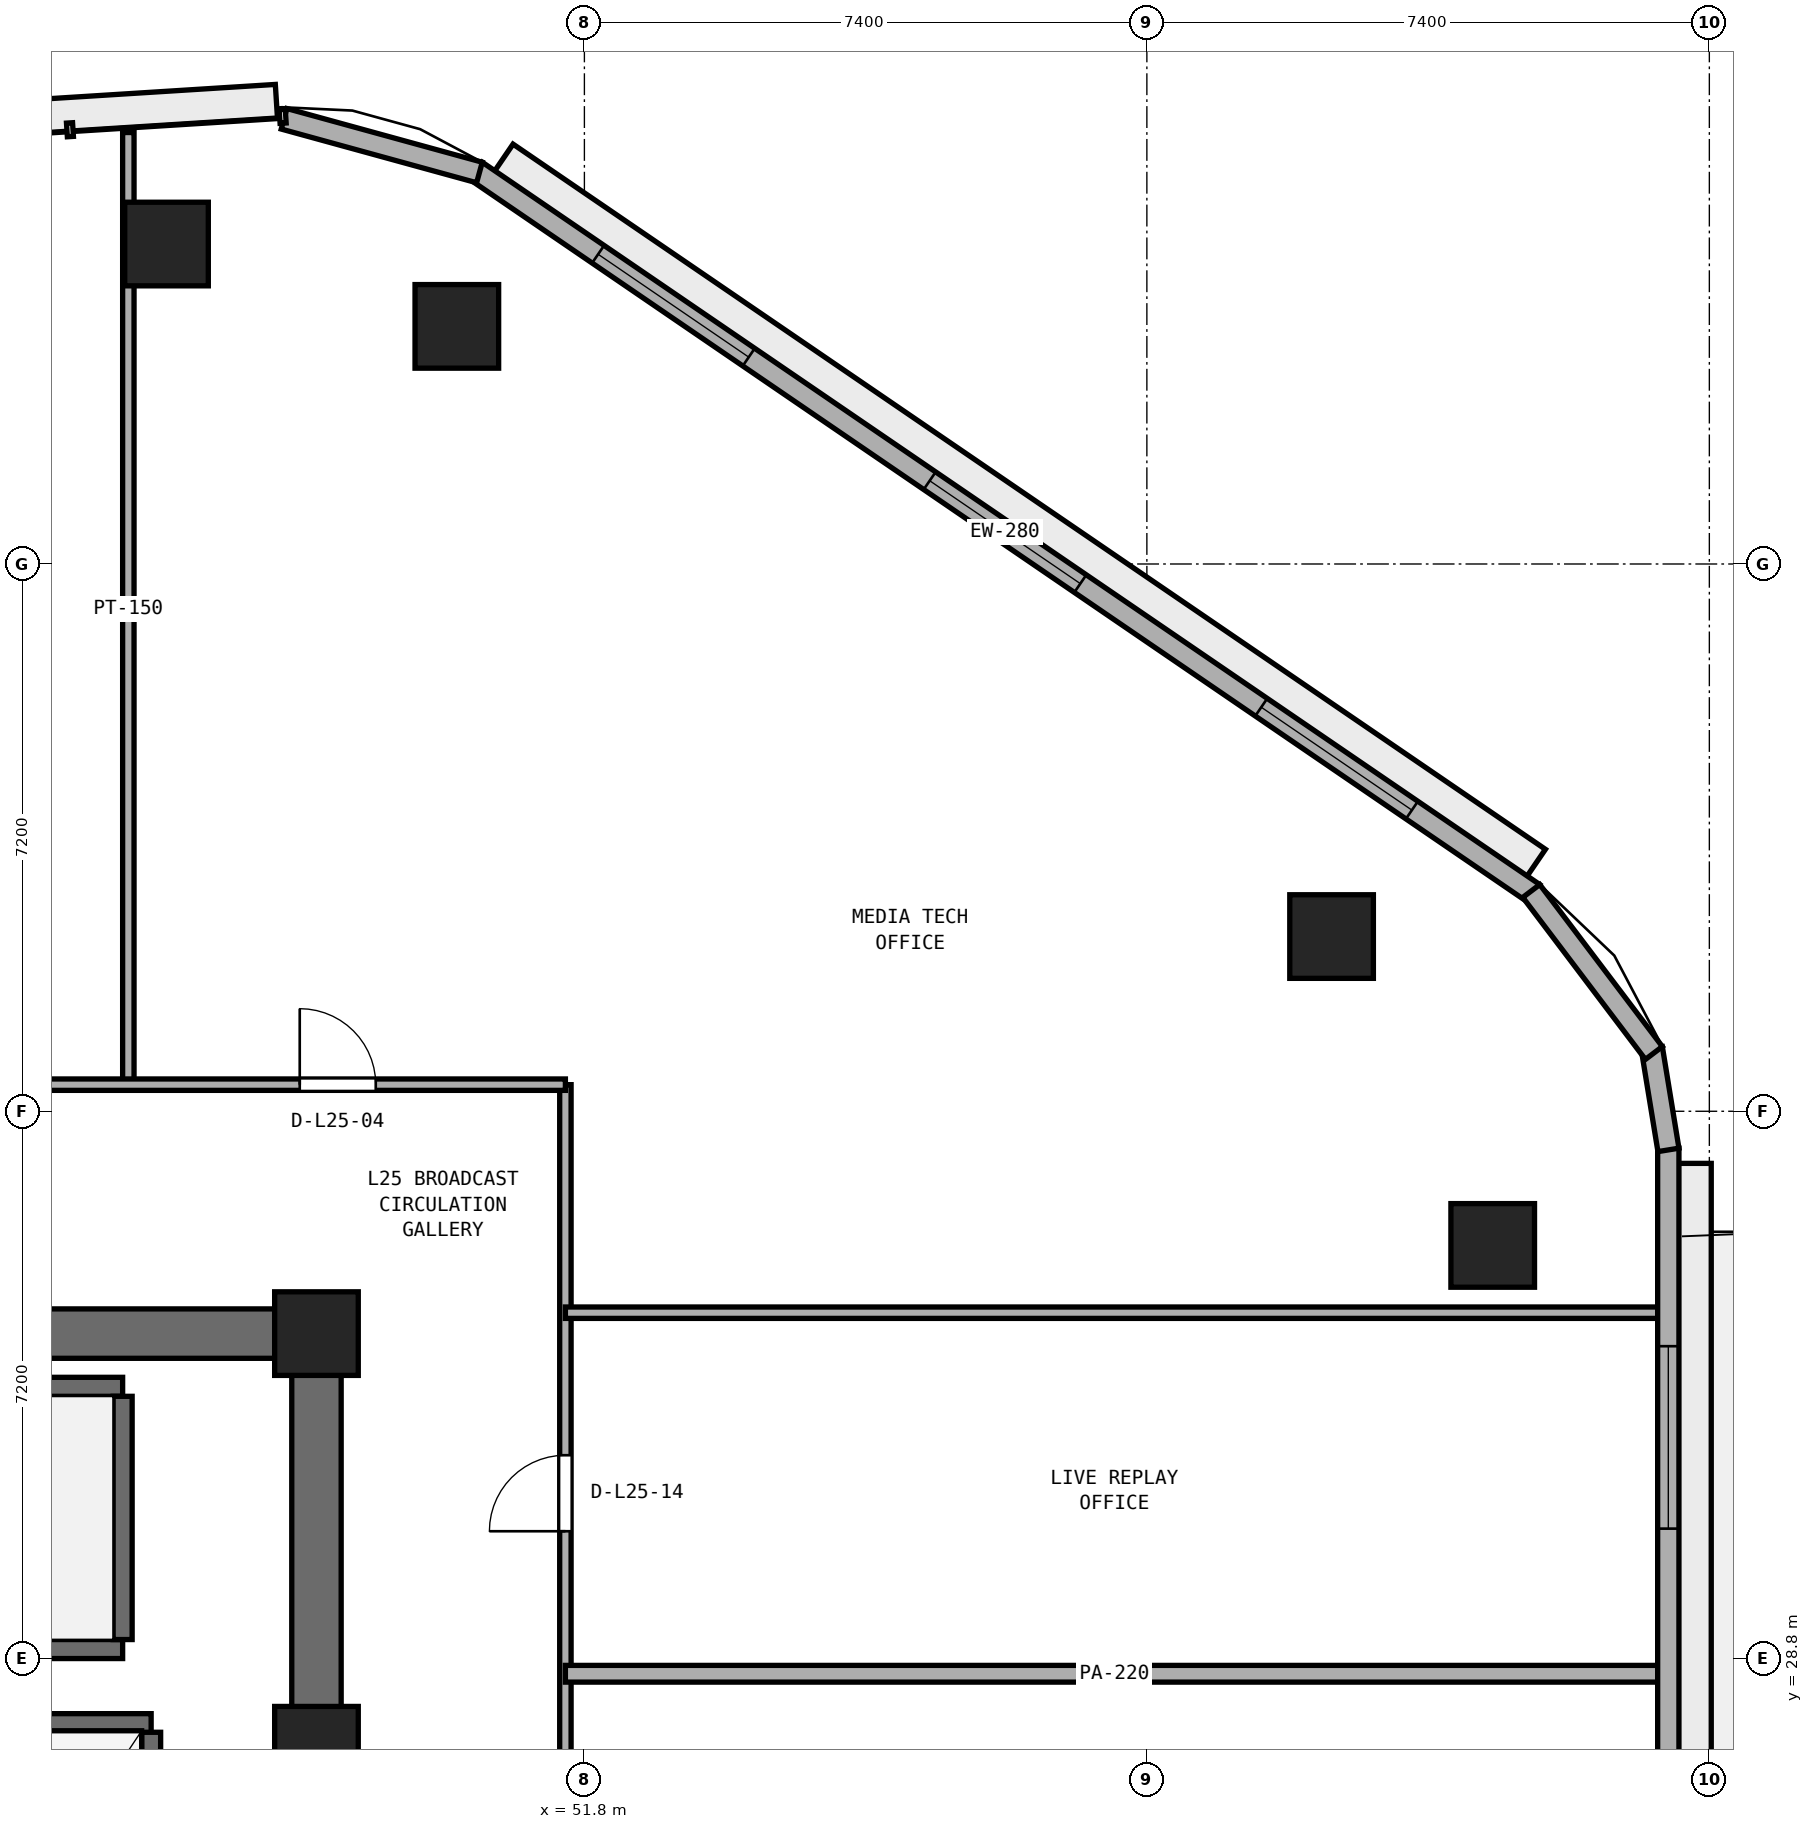
"""IFC4 building model, lengths in metres.
Left out: names, types, materials, properties, quantities, classifications, styles, units other than length and angle.
Written with IfcOpenShell. Run it as: python <this file> out.ifc"""

import sys

from ifc_helpers import new_model, si_unit, direction, frame, frame_2d, origin, origin_2d, place, context, subcontext, project, spatial, rectangle, extrude, element, fill, save


model = new_model("IFC4")
c1 = context("Model", 3, precision=1e-05, world=origin(), true_north=direction((0.0, 1.0)))
c2 = subcontext(c1, "Body", "Model", "MODEL_VIEW")
j1 = project(units=[si_unit("LENGTHUNIT", "METRE"), si_unit("PLANEANGLEUNIT", "RADIAN")], contexts=[c1])
p1 = place(None, origin())
s1 = spatial("IfcSite", under=j1, at=p1, CompositionType="ELEMENT")
p2 = place(p1, origin())
s2 = spatial("IfcBuilding", under=s1, at=p2, CompositionType="ELEMENT")
p3 = place(p2, frame((0.0, 0.0, 101.0)))
s3 = spatial("IfcBuildingStorey", under=s2, at=p3, CompositionType="ELEMENT", Elevation=101.0)
p4 = place(p3, frame((25.4, 33.075, 0.0), z_axis=(0.0, 0.0, 1.0), x_axis=(1.0, 0.0, 0.0)))
e1 = element("IfcWall", 1, at=p4, inside=s3, PredefinedType="SHEAR", context=c2, shape_type="SweptSolid", body=[
    extrude(rectangle(XDim=23.2, YDim=0.65, at=frame_2d((11.6, 0.0))), origin(), (0.0, 0.0, 1.0), 3.525),
])
p5 = place(p3, frame((48.275, 17.65, 0.0), z_axis=(0.0, 0.0, 1.0), x_axis=(0.0, 1.0, 0.0)))
e2 = element("IfcWall", 2, at=p5, inside=s3, PredefinedType="SHEAR", context=c2, shape_type="SweptSolid", body=[
    extrude(rectangle(XDim=15.1, YDim=0.65, at=frame_2d((7.55, 0.0))), origin(), (0.0, 0.0, 1.0), 3.525),
])
p6 = place(p5, frame((5.65, 0.0, 0.0)))
e3 = element("IfcOpeningElement", 3, at=p6, cuts=e2, PredefinedType="OPENING", context=c2, shape_type="SweptSolid", body=[
    extrude(rectangle(XDim=1.5, YDim=2.15, at=frame_2d((0.75, 1.075))), frame((0.0, 0.335, 0.0), z_axis=(0.0, -1.0, 0.0), x_axis=(1.0, 0.0, 0.0)), (0.0, 0.0, 1.0), 0.67),
])
for number, where, z_axis, x_axis in (
    (4, (48.275, 27.62, 0.0), (0.0, 0.0, 1.0), (1.0, 0.0, 0.0)),
    (5, (48.275, 33.075, 0.0), (0.0, 0.0, 1.0), (1.0, 0.0, 0.0)),
):
    element("IfcColumn", number, at=place(p3, frame(where, z_axis=z_axis, x_axis=x_axis)), inside=s3, PredefinedType="PILASTER", context=c2, shape_type="SweptSolid", body=[
        extrude(rectangle(XDim=1.1, YDim=1.1, at=origin_2d()), origin(), (0.0, 0.0, 1.0), 3.8),
    ])
for number, where, z_axis, x_axis in (
    (6, (63.75, 34.235, 0.0), (0.0, 0.0, 1.0), (1.0, 0.0, 0.0)),
    (7, (61.63, 38.299, 0.0), (0.0, 0.0, 1.0), (1.0, 0.0, 0.0)),
    (8, (50.122, 46.326, 0.0), (0.0, 0.0, 1.0), (1.0, 0.0, 0.0)),
    (9, (46.302, 47.409, 0.0), (0.0, 0.0, 1.0), (1.0, 0.0, 0.0)),
):
    element("IfcColumn", number, at=place(p3, frame(where, z_axis=z_axis, x_axis=x_axis)), inside=s3, PredefinedType="COLUMN", context=c2, shape_type="SweptSolid", body=[
        extrude(rectangle(XDim=1.1, YDim=1.1, at=origin_2d()), origin(), (0.0, 0.0, 1.0), 3.8),
    ])
for number, where, z_axis, x_axis in (
    (10, (38.425, 28.925, 0.0), (0.0, 0.0, 1.0), (1.0, 0.0, 0.0)),
    (11, (38.425, 32.375, 0.0), (0.0, 0.0, 1.0), (1.0, 0.0, 0.0)),
):
    element("IfcWall", number, at=place(p3, frame(where, z_axis=z_axis, x_axis=x_axis)), inside=s3, PredefinedType="SHEAR", context=c2, shape_type="SweptSolid", body=[
        extrude(rectangle(XDim=7.3, YDim=0.25, at=frame_2d((3.65, 0.0))), origin(), (0.0, 0.0, 1.0), 3.525),
    ])
p7 = place(p3, frame((45.725, 29.05, 0.0), z_axis=(0.0, 0.0, 1.0), x_axis=(0.0, 1.0, 0.0)))
e12 = element("IfcWall", 12, at=p7, inside=s3, PredefinedType="SHEAR", context=c2, shape_type="SweptSolid", body=[
    extrude(rectangle(XDim=3.2, YDim=0.25, at=frame_2d((1.6, 0.0))), origin(), (0.0, 0.0, 1.0), 3.525),
])
p8 = place(p3, frame((44.25, 27.95, 0.0), z_axis=(0.0, 0.0, 1.0), x_axis=(1.0, 0.0, 0.0)))
e13 = element("IfcWall", 13, at=p8, inside=s3, PredefinedType="SHEAR", context=c2, shape_type="SweptSolid", body=[
    extrude(rectangle(XDim=1.85, YDim=0.25, at=frame_2d((0.925, 0.0))), origin(), (0.0, 0.0, 1.0), 3.525),
])
p9 = place(p3, frame((46.1, 25.47, 0.0), z_axis=(0.0, 0.0, 1.0), x_axis=(0.0, 1.0, 0.0)))
e14 = element("IfcWall", 14, at=p9, inside=s3, PredefinedType="SHEAR", context=c2, shape_type="SweptSolid", body=[
    extrude(rectangle(XDim=2.36, YDim=0.25, at=frame_2d((1.18, 0.0))), origin(), (0.0, 0.0, 1.0), 3.525),
])
p10 = place(p3, frame((51.55, 14.05, 0.0), z_axis=(0.0, 0.0, 1.0), x_axis=(0.0, 1.0, 0.0)))
e15 = element("IfcWall", 15, at=p10, inside=s3, PredefinedType="PARTITIONING", context=c2, shape_type="SweptSolid", body=[
    extrude(rectangle(XDim=22.3, YDim=0.15, at=frame_2d((11.15, 0.0))), origin(), (0.0, 0.0, 1.0), 3.525),
])
p11 = place(p10, frame((4.325, 0.0, 0.0)))
e16 = element("IfcOpeningElement", 16, at=p11, cuts=e15, PredefinedType="OPENING", context=c2, shape_type="SweptSolid", body=[
    extrude(rectangle(XDim=0.9, YDim=2.1, at=frame_2d((0.45, 1.05))), frame((0.0, 0.085, 0.0), z_axis=(0.0, -1.0, 0.0), x_axis=(1.0, 0.0, 0.0)), (0.0, 0.0, 1.0), 0.17),
])
p12 = place(p10, frame((10.05, 0.0, 0.0)))
e17 = element("IfcOpeningElement", 17, at=p12, cuts=e15, PredefinedType="OPENING", context=c2, shape_type="SweptSolid", body=[
    extrude(rectangle(XDim=1.0, YDim=2.12, at=frame_2d((0.5, 1.06))), frame((0.0, 0.085, 0.0), z_axis=(0.0, -1.0, 0.0), x_axis=(1.0, 0.0, 0.0)), (0.0, 0.0, 1.0), 0.17),
])
p13 = place(p10, frame((16.425, 0.0, 0.0)))
e18 = element("IfcOpeningElement", 18, at=p13, cuts=e15, PredefinedType="OPENING", context=c2, shape_type="SweptSolid", body=[
    extrude(rectangle(XDim=1.0, YDim=2.12, at=frame_2d((0.5, 1.06))), frame((0.0, 0.085, 0.0), z_axis=(0.0, -1.0, 0.0), x_axis=(1.0, 0.0, 0.0)), (0.0, 0.0, 1.0), 0.17),
])
p14 = place(p3, frame((45.8, 36.35, 0.0), z_axis=(0.0, 0.0, 1.0), x_axis=(0.0, 1.0, 0.0)))
e19 = element("IfcWall", 19, at=p14, inside=s3, PredefinedType="PARTITIONING", context=c2, shape_type="SweptSolid", body=[
    extrude(rectangle(XDim=12.526, YDim=0.15, at=frame_2d((6.263, 0.0))), origin(), (0.0, 0.0, 1.0), 3.525),
])
p15 = place(p3, frame((51.55, 28.6, 0.0), z_axis=(0.0, 0.0, 1.0), x_axis=(1.0, 0.0, 0.0)))
e20 = element("IfcWall", 20, at=p15, inside=s3, PredefinedType="PARTITIONING", context=c2, shape_type="SweptSolid", body=[
    extrude(rectangle(XDim=14.445, YDim=0.22, at=frame_2d((7.223, 0.0))), origin(), (0.0, 0.0, 1.0), 3.525),
])
p16 = place(p3, frame((51.55, 33.35, 0.0), z_axis=(0.0, 0.0, 1.0), x_axis=(1.0, 0.0, 0.0)))
e21 = element("IfcWall", 21, at=p16, inside=s3, PredefinedType="PARTITIONING", context=c2, shape_type="SweptSolid", body=[
    extrude(rectangle(XDim=14.445, YDim=0.15, at=frame_2d((7.223, 0.0))), origin(), (0.0, 0.0, 1.0), 2.908),
])
p17 = place(p3, frame((22.45, 36.35, 0.0), z_axis=(0.0, 0.0, 1.0), x_axis=(1.0, 0.0, 0.0)))
e22 = element("IfcWall", 22, at=p17, inside=s3, PredefinedType="PARTITIONING", context=c2, shape_type="SweptSolid", body=[
    extrude(rectangle(XDim=29.1, YDim=0.15, at=frame_2d((14.55, 0.0))), origin(), (0.0, 0.0, 1.0), 3.525),
])
p18 = place(p17, frame((2.795, 0.0, 0.0)))
e23 = element("IfcOpeningElement", 23, at=p18, cuts=e22, PredefinedType="OPENING", context=c2, shape_type="SweptSolid", body=[
    extrude(rectangle(XDim=1.0, YDim=2.12, at=frame_2d((0.5, 1.06))), frame((0.0, 0.085, 0.0), z_axis=(0.0, -1.0, 0.0), x_axis=(1.0, 0.0, 0.0)), (0.0, 0.0, 1.0), 0.17),
])
p19 = place(p17, frame((10.15, 0.0, 0.0)))
e24 = element("IfcOpeningElement", 24, at=p19, cuts=e22, PredefinedType="OPENING", context=c2, shape_type="SweptSolid", body=[
    extrude(rectangle(XDim=1.0, YDim=2.12, at=frame_2d((0.5, 1.06))), frame((0.0, 0.085, 0.0), z_axis=(0.0, -1.0, 0.0), x_axis=(1.0, 0.0, 0.0)), (0.0, 0.0, 1.0), 0.17),
])
p20 = place(p17, frame((18.65, 0.0, 0.0)))
e25 = element("IfcOpeningElement", 25, at=p20, cuts=e22, PredefinedType="OPENING", context=c2, shape_type="SweptSolid", body=[
    extrude(rectangle(XDim=1.0, YDim=2.12, at=frame_2d((0.5, 1.06))), frame((0.0, 0.085, 0.0), z_axis=(0.0, -1.0, 0.0), x_axis=(1.0, 0.0, 0.0)), (0.0, 0.0, 1.0), 0.17),
])
p21 = place(p17, frame((25.605, 0.0, 0.0)))
e26 = element("IfcOpeningElement", 26, at=p21, cuts=e22, PredefinedType="OPENING", context=c2, shape_type="SweptSolid", body=[
    extrude(rectangle(XDim=1.0, YDim=2.12, at=frame_2d((0.5, 1.06))), frame((0.0, 0.085, 0.0), z_axis=(0.0, -1.0, 0.0), x_axis=(1.0, 0.0, 0.0)), (0.0, 0.0, 1.0), 0.17),
])
p22 = place(p3, frame((66.06, 16.183, 0.0), z_axis=(0.0, 0.0, 1.0), x_axis=(0.0, 1.0, 0.0)))
e27 = element("IfcWall", 27, at=p22, inside=s3, PredefinedType="STANDARD", context=c2, shape_type="SweptSolid", body=[
    extrude(rectangle(XDim=19.331, YDim=0.28, at=frame_2d((9.666, 0.0))), origin(), (0.0, 0.0, 1.0), 3.525),
])
p23 = place(p22, frame((9.115, 0.0, 0.0)))
e28 = element("IfcOpeningElement", 28, at=p23, cuts=e27, PredefinedType="OPENING", context=c2, shape_type="SweptSolid", body=[
    extrude(rectangle(XDim=1.1, YDim=2.2, at=frame_2d((0.55, 1.1))), frame((0.0, 0.15, 0.0), z_axis=(0.0, -1.0, 0.0), x_axis=(1.0, 0.0, 0.0)), (0.0, 0.0, 1.0), 0.3),
])
p24 = place(p22, frame((1.575, 0.0, 0.9)))
e29 = element("IfcOpeningElement", 29, at=p24, cuts=e27, PredefinedType="OPENING", context=c2, shape_type="SweptSolid", body=[
    extrude(rectangle(XDim=2.4, YDim=1.75, at=frame_2d((1.2, 0.875))), frame((0.0, 0.15, 0.0), z_axis=(0.0, -1.0, 0.0), x_axis=(1.0, 0.0, 0.0)), (0.0, 0.0, 1.0), 0.3),
])
p25 = place(p22, frame((14.326, 0.0, 0.9)))
e30 = element("IfcOpeningElement", 30, at=p25, cuts=e27, PredefinedType="OPENING", context=c2, shape_type="SweptSolid", body=[
    extrude(rectangle(XDim=2.4, YDim=1.75, at=frame_2d((1.2, 0.875))), frame((0.0, 0.15, 0.0), z_axis=(0.0, -1.0, 0.0), x_axis=(1.0, 0.0, 0.0)), (0.0, 0.0, 1.0), 0.3),
])
p26 = place(p3, frame((64.29, 38.867, 0.0), z_axis=(0.0, 0.0, 1.0), x_axis=(-0.825755550159, 0.564028165416, 0.0)))
e31 = element("IfcWall", 31, at=p26, inside=s3, PredefinedType="STANDARD", context=c2, shape_type="SweptSolid", body=[
    extrude(rectangle(XDim=16.848, YDim=0.28, at=frame_2d((8.424, 0.0))), origin(), (0.0, 0.0, 1.0), 3.525),
])
p27 = place(p26, frame((1.941, 0.0, 0.9)))
e32 = element("IfcOpeningElement", 32, at=p27, cuts=e31, PredefinedType="OPENING", context=c2, shape_type="SweptSolid", body=[
    extrude(rectangle(XDim=2.4, YDim=1.75, at=frame_2d((1.2, 0.875))), frame((0.0, 0.15, 0.0), z_axis=(0.0, -1.0, 0.0), x_axis=(1.0, 0.0, 0.0)), (0.0, 0.0, 1.0), 0.3),
])
p28 = place(p26, frame((7.224, 0.0, 0.9)))
e33 = element("IfcOpeningElement", 33, at=p28, cuts=e31, PredefinedType="OPENING", context=c2, shape_type="SweptSolid", body=[
    extrude(rectangle(XDim=2.4, YDim=1.75, at=frame_2d((1.2, 0.875))), frame((0.0, 0.15, 0.0), z_axis=(0.0, -1.0, 0.0), x_axis=(1.0, 0.0, 0.0)), (0.0, 0.0, 1.0), 0.3),
])
p29 = place(p26, frame((12.507, 0.0, 0.9)))
e34 = element("IfcOpeningElement", 34, at=p29, cuts=e31, PredefinedType="OPENING", context=c2, shape_type="SweptSolid", body=[
    extrude(rectangle(XDim=2.4, YDim=1.75, at=frame_2d((1.2, 0.875))), frame((0.0, 0.15, 0.0), z_axis=(0.0, -1.0, 0.0), x_axis=(1.0, 0.0, 0.0)), (0.0, 0.0, 1.0), 0.3),
])
p30 = place(p3, frame((66.062, 35.492, 0.0), z_axis=(0.0, 0.0, 1.0), x_axis=(-0.161182073582, 0.986924687682, 0.0)))
e35 = element("IfcWall", 35, at=p30, inside=s3, PredefinedType="STANDARD", context=c2, shape_type="SweptSolid", body=[
    extrude(rectangle(XDim=1.354, YDim=0.28, at=frame_2d((0.677, 0.0))), origin(), (0.0, 0.0, 1.0), 3.525),
])
p31 = place(p3, frame((65.87, 36.767, 0.0), z_axis=(0.0, 0.0, 1.0), x_axis=(-0.603370463754, 0.797461023166, 0.0)))
e36 = element("IfcWall", 36, at=p31, inside=s3, PredefinedType="STANDARD", context=c2, shape_type="SweptSolid", body=[
    extrude(rectangle(XDim=2.673, YDim=0.28, at=frame_2d((1.336, 0.0))), origin(), (0.0, 0.0, 1.0), 3.525),
])
p32 = place(p3, frame((50.419, 48.351, 0.0), z_axis=(0.0, 0.0, 1.0), x_axis=(-0.964263320055, 0.264945748402, 0.0)))
e37 = element("IfcWall", 37, at=p32, inside=s3, PredefinedType="STANDARD", context=c2, shape_type="SweptSolid", body=[
    extrude(rectangle(XDim=2.666, YDim=0.28, at=frame_2d((1.333, 0.0))), origin(), (0.0, 0.0, 1.0), 3.525),
])
p33 = place(p21, origin())
e38 = element("IfcDoor", 38, at=p33, inside=s3, OperationType="SINGLE_SWING_LEFT", PredefinedType="DOOR", context=c2, shape_type="SweptSolid", body=[
    extrude(rectangle(XDim=1.0, YDim=2.12, at=frame_2d((0.5, 1.06))), frame((0.0, 0.025, 0.0), z_axis=(0.0, -1.0, 0.0), x_axis=(1.0, 0.0, 0.0)), (0.0, 0.0, 1.0), 0.05),
])
fill(e26, e38)
p34 = place(p13, origin())
e39 = element("IfcDoor", 39, at=p34, inside=s3, OperationType="SINGLE_SWING_LEFT", PredefinedType="DOOR", context=c2, shape_type="SweptSolid", body=[
    extrude(rectangle(XDim=1.0, YDim=2.12, at=frame_2d((0.5, 1.06))), frame((0.0, 0.025, 0.0), z_axis=(0.0, -1.0, 0.0), x_axis=(1.0, 0.0, 0.0)), (0.0, 0.0, 1.0), 0.05),
])
fill(e18, e39)
p35 = place(p25, origin())
e40 = element("IfcWindow", 40, at=p35, inside=s3, PartitioningType="SINGLE_PANEL", PredefinedType="WINDOW", context=c2, shape_type="SweptSolid", body=[
    extrude(rectangle(XDim=2.4, YDim=1.75, at=frame_2d((1.2, 0.875))), frame((0.0, 0.03, 0.0), z_axis=(0.0, -1.0, 0.0), x_axis=(1.0, 0.0, 0.0)), (0.0, 0.0, 1.0), 0.06),
])
fill(e30, e40)
p36 = place(p27, origin())
e41 = element("IfcWindow", 41, at=p36, inside=s3, PartitioningType="SINGLE_PANEL", PredefinedType="WINDOW", context=c2, shape_type="SweptSolid", body=[
    extrude(rectangle(XDim=2.4, YDim=1.75, at=frame_2d((1.2, 0.875))), frame((0.0, 0.03, 0.0), z_axis=(0.0, -1.0, 0.0), x_axis=(1.0, 0.0, 0.0)), (0.0, 0.0, 1.0), 0.06),
])
fill(e32, e41)
p37 = place(p28, origin())
e42 = element("IfcWindow", 42, at=p37, inside=s3, PartitioningType="SINGLE_PANEL", PredefinedType="WINDOW", context=c2, shape_type="SweptSolid", body=[
    extrude(rectangle(XDim=2.4, YDim=1.75, at=frame_2d((1.2, 0.875))), frame((0.0, 0.03, 0.0), z_axis=(0.0, -1.0, 0.0), x_axis=(1.0, 0.0, 0.0)), (0.0, 0.0, 1.0), 0.06),
])
fill(e33, e42)
p38 = place(p29, origin())
e43 = element("IfcWindow", 43, at=p38, inside=s3, PartitioningType="SINGLE_PANEL", PredefinedType="WINDOW", context=c2, shape_type="SweptSolid", body=[
    extrude(rectangle(XDim=2.4, YDim=1.75, at=frame_2d((1.2, 0.875))), frame((0.0, 0.03, 0.0), z_axis=(0.0, -1.0, 0.0), x_axis=(1.0, 0.0, 0.0)), (0.0, 0.0, 1.0), 0.06),
])
fill(e34, e43)
save(model, sys.argv[1])
